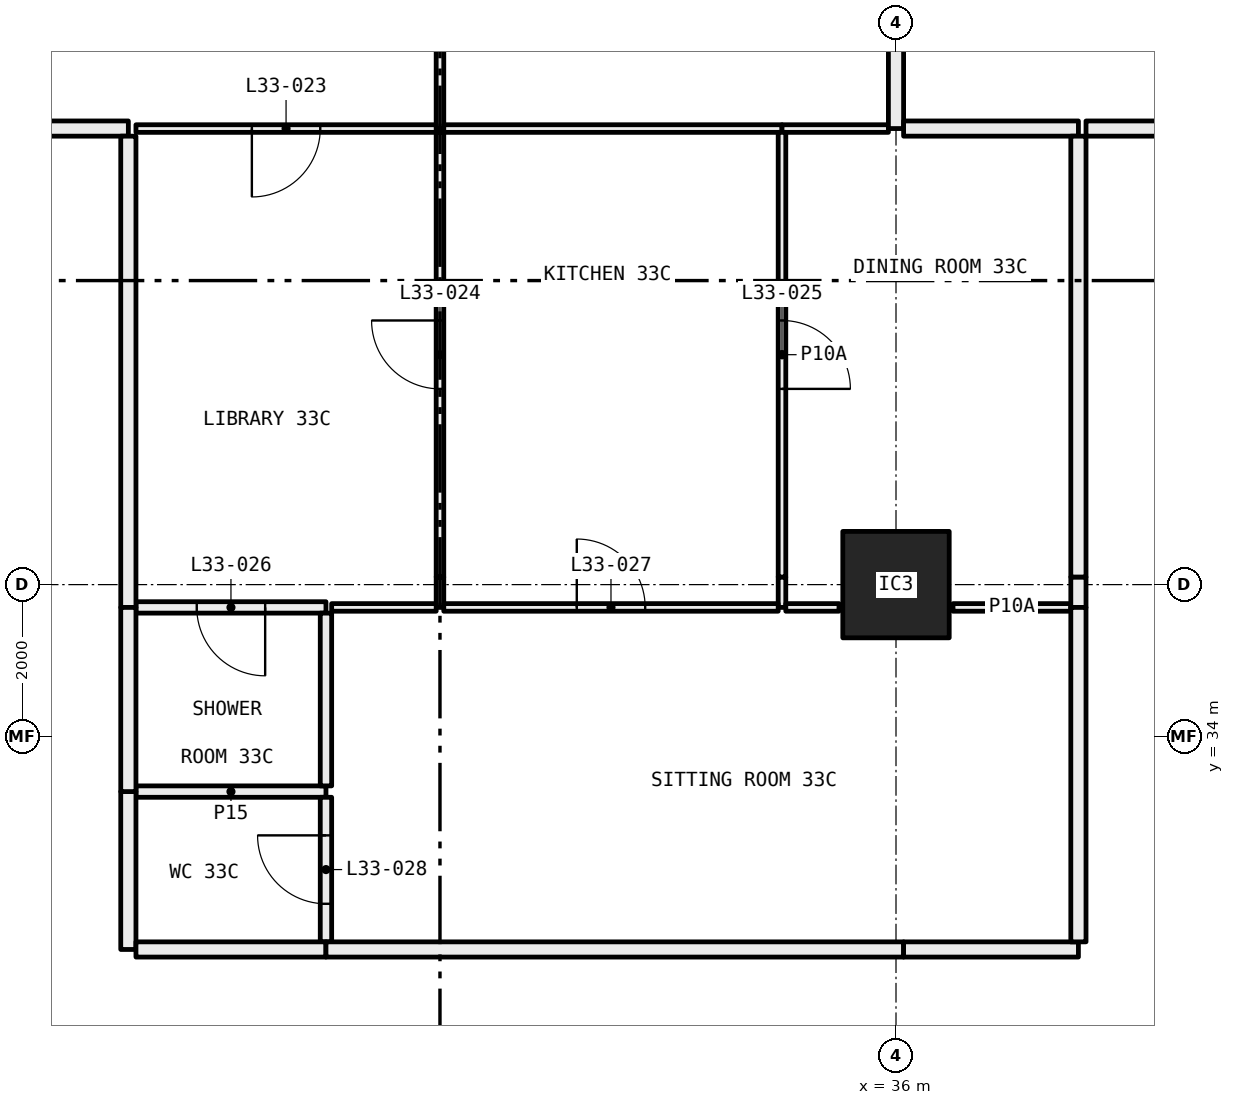
"""IFC4 building model, lengths in metres.
Left out: names, types, materials, properties, quantities, classifications, styles, units other than length and angle.
Written with IfcOpenShell. Run it as: python <this file> out.ifc"""

import sys

from ifc_helpers import new_model, si_unit, direction, frame, frame_2d, origin, origin_2d, place, context, subcontext, project, spatial, rectangle, hollow_rectangle, extrude, element, fill, save


model = new_model("IFC4")
c1 = context("Model", 3, precision=1e-05, world=origin(), true_north=direction((0.0, 1.0)))
c2 = subcontext(c1, "Body", "Model", "MODEL_VIEW")
j1 = project(units=[si_unit("LENGTHUNIT", "METRE"), si_unit("PLANEANGLEUNIT", "RADIAN")], contexts=[c1])
p1 = place(None, origin())
s1 = spatial("IfcSite", under=j1, at=p1, CompositionType="ELEMENT")
p2 = place(p1, origin())
s2 = spatial("IfcBuilding", under=s1, at=p2, CompositionType="ELEMENT")
p3 = place(p2, frame((0.0, 0.0, 127.65)))
s3 = spatial("IfcBuildingStorey", under=s2, at=p3, CompositionType="ELEMENT", Elevation=127.65)
p4 = place(p3, frame((36.0, 36.0, 0.0), z_axis=(0.0, 0.0, 1.0), x_axis=(1.0, 0.0, 0.0)))
e1 = element("IfcColumn", 1, at=p4, inside=s3, PredefinedType="COLUMN", context=c2, shape_type="SweptSolid", body=[
    extrude(hollow_rectangle(XDim=1.4, YDim=1.4, WallThickness=0.06, at=origin_2d()), origin(), (0.0, 0.0, 1.0), 3.05),
])
p5 = place(p3, frame((30.0, 42.0, 0.0), z_axis=(0.0, 0.0, 1.0), x_axis=(0.0, 1.0, 0.0)))
e2 = element("IfcWall", 2, at=p5, inside=s3, PredefinedType="PARTITIONING", context=c2, shape_type="SweptSolid", body=[
    extrude(rectangle(XDim=5.28, YDim=0.1, at=frame_2d((2.64, 0.0))), origin(), (0.0, 0.0, 1.0), 3.05),
])
p6 = place(p5, frame((2.19, 0.0, 0.0)))
e3 = element("IfcOpeningElement", 3, at=p6, cuts=e2, PredefinedType="OPENING", context=c2, shape_type="SweptSolid", body=[
    extrude(rectangle(XDim=0.9, YDim=2.1, at=frame_2d((0.45, 1.05))), frame((0.0, 0.06, 0.0), z_axis=(0.0, -1.0, 0.0), x_axis=(1.0, 0.0, 0.0)), (0.0, 0.0, 1.0), 0.12),
])
p7 = place(p3, frame((26.0, 42.0, 0.0), z_axis=(0.0, 0.0, 1.0), x_axis=(1.0, 0.0, 0.0)))
e4 = element("IfcWall", 4, at=p7, inside=s3, PredefinedType="PARTITIONING", context=c2, shape_type="SweptSolid", body=[
    extrude(rectangle(XDim=3.95, YDim=0.1, at=frame_2d((1.975, 0.0))), origin(), (0.0, 0.0, 1.0), 3.05),
])
p8 = place(p7, frame((1.525, 0.0, 0.0)))
e5 = element("IfcOpeningElement", 5, at=p8, cuts=e4, PredefinedType="OPENING", context=c2, shape_type="SweptSolid", body=[
    extrude(rectangle(XDim=0.9, YDim=2.1, at=frame_2d((0.45, 1.05))), frame((0.0, 0.06, 0.0), z_axis=(0.0, -1.0, 0.0), x_axis=(1.0, 0.0, 0.0)), (0.0, 0.0, 1.0), 0.12),
])
p9 = place(p3, frame((24.0, 42.0, 0.0), z_axis=(0.0, 0.0, 1.0), x_axis=(1.0, 0.0, 0.0)))
e6 = element("IfcWall", 6, at=p9, inside=s3, PredefinedType="PARTITIONING", context=c2, shape_type="SweptSolid", body=[
    extrude(rectangle(XDim=1.9, YDim=0.2, at=frame_2d((0.95, 0.0))), origin(), (0.0, 0.0, 1.0), 3.05),
])
p10 = place(p3, frame((30.05, 42.0, 0.0), z_axis=(0.0, 0.0, 1.0), x_axis=(1.0, 0.0, 0.0)))
e7 = element("IfcWall", 7, at=p10, inside=s3, PredefinedType="PARTITIONING", context=c2, shape_type="SweptSolid", body=[
    extrude(rectangle(XDim=4.45, YDim=0.1, at=frame_2d((2.225, 0.0))), origin(), (0.0, 0.0, 1.0), 3.05),
])
p11 = place(p3, frame((34.5, 42.0, 0.0), z_axis=(0.0, 0.0, 1.0), x_axis=(1.0, 0.0, 0.0)))
e8 = element("IfcWall", 8, at=p11, inside=s3, PredefinedType="PARTITIONING", context=c2, shape_type="SweptSolid", body=[
    extrude(rectangle(XDim=1.4, YDim=0.1, at=frame_2d((0.7, 0.0))), origin(), (0.0, 0.0, 1.0), 3.05),
])
p12 = place(p3, frame((36.0, 42.0, 0.0), z_axis=(0.0, 0.0, 1.0), x_axis=(0.0, 1.0, 0.0)))
e9 = element("IfcWall", 9, at=p12, inside=s3, PredefinedType="PARTITIONING", context=c2, shape_type="SweptSolid", body=[
    extrude(rectangle(XDim=5.28, YDim=0.2, at=frame_2d((2.64, 0.0))), origin(), (0.0, 0.0, 1.0), 2.45),
])
p13 = place(p3, frame((30.0, 35.7, 0.0), z_axis=(0.0, 0.0, 1.0), x_axis=(0.0, 1.0, 0.0)))
e10 = element("IfcWall", 10, at=p13, inside=s3, PredefinedType="PARTITIONING", context=c2, shape_type="SweptSolid", body=[
    extrude(rectangle(XDim=0.4, YDim=0.1, at=frame_2d((0.2, 0.0))), origin(), (0.0, 0.0, 1.0), 2.45),
])
p14 = place(p3, frame((30.0, 36.1, 0.0), z_axis=(0.0, 0.0, 1.0), x_axis=(0.0, 1.0, 0.0)))
e11 = element("IfcWall", 11, at=p14, inside=s3, PredefinedType="PARTITIONING", context=c2, shape_type="SweptSolid", body=[
    extrude(rectangle(XDim=5.85, YDim=0.1, at=frame_2d((2.925, 0.0))), origin(), (0.0, 0.0, 1.0), 3.05),
])
p15 = place(p14, frame((2.475, 0.0, 0.0)))
e12 = element("IfcOpeningElement", 12, at=p15, cuts=e11, PredefinedType="OPENING", context=c2, shape_type="SweptSolid", body=[
    extrude(rectangle(XDim=0.9, YDim=2.1, at=frame_2d((0.45, 1.05))), frame((0.0, 0.06, 0.0), z_axis=(0.0, -1.0, 0.0), x_axis=(1.0, 0.0, 0.0)), (0.0, 0.0, 1.0), 0.12),
])
p16 = place(p3, frame((26.0, 35.7, 0.0), z_axis=(0.0, 0.0, 1.0), x_axis=(1.0, 0.0, 0.0)))
e13 = element("IfcWall", 13, at=p16, inside=s3, PredefinedType="PARTITIONING", context=c2, shape_type="SweptSolid", body=[
    extrude(rectangle(XDim=2.5, YDim=0.15, at=frame_2d((1.25, 0.0))), origin(), (0.0, 0.0, 1.0), 3.05),
])
p17 = place(p16, frame((0.8, 0.0, 0.0)))
e14 = element("IfcOpeningElement", 14, at=p17, cuts=e13, PredefinedType="OPENING", context=c2, shape_type="SweptSolid", body=[
    extrude(rectangle(XDim=0.9, YDim=2.1, at=frame_2d((0.45, 1.05))), frame((0.0, 0.085, 0.0), z_axis=(0.0, -1.0, 0.0), x_axis=(1.0, 0.0, 0.0)), (0.0, 0.0, 1.0), 0.17),
])
p18 = place(p3, frame((28.575, 35.7, 0.0), z_axis=(0.0, 0.0, 1.0), x_axis=(1.0, 0.0, 0.0)))
e15 = element("IfcWall", 15, at=p18, inside=s3, PredefinedType="PARTITIONING", context=c2, shape_type="SweptSolid", body=[
    extrude(rectangle(XDim=1.375, YDim=0.1, at=frame_2d((0.688, 0.0))), origin(), (0.0, 0.0, 1.0), 3.05),
])
p19 = place(p3, frame((25.9, 41.9, 0.0), z_axis=(0.0, 0.0, 1.0), x_axis=(0.0, -1.0, 0.0)))
e16 = element("IfcWall", 16, at=p19, inside=s3, PredefinedType="PARTITIONING", context=c2, shape_type="SweptSolid", body=[
    extrude(rectangle(XDim=6.2, YDim=0.2, at=frame_2d((3.1, 0.0))), origin(), (0.0, 0.0, 1.0), 2.45),
])
p20 = place(p3, frame((34.5, 35.7, 0.0), z_axis=(0.0, 0.0, 1.0), x_axis=(0.0, 1.0, 0.0)))
e17 = element("IfcWall", 17, at=p20, inside=s3, PredefinedType="PARTITIONING", context=c2, shape_type="SweptSolid", body=[
    extrude(rectangle(XDim=0.4, YDim=0.1, at=frame_2d((0.2, 0.0))), origin(), (0.0, 0.0, 1.0), 2.45),
])
p21 = place(p3, frame((34.5, 36.1, 0.0), z_axis=(0.0, 0.0, 1.0), x_axis=(0.0, 1.0, 0.0)))
e18 = element("IfcWall", 18, at=p21, inside=s3, PredefinedType="PARTITIONING", context=c2, shape_type="SweptSolid", body=[
    extrude(rectangle(XDim=5.85, YDim=0.1, at=frame_2d((2.925, 0.0))), origin(), (0.0, 0.0, 1.0), 3.05),
])
p22 = place(p21, frame((2.475, 0.0, 0.0)))
e19 = element("IfcOpeningElement", 19, at=p22, cuts=e18, PredefinedType="OPENING", context=c2, shape_type="SweptSolid", body=[
    extrude(rectangle(XDim=0.9, YDim=2.1, at=frame_2d((0.45, 1.05))), frame((0.0, 0.06, 0.0), z_axis=(0.0, -1.0, 0.0), x_axis=(1.0, 0.0, 0.0)), (0.0, 0.0, 1.0), 0.12),
])
p23 = place(p3, frame((30.05, 35.7, 0.0), z_axis=(0.0, 0.0, 1.0), x_axis=(1.0, 0.0, 0.0)))
e20 = element("IfcWall", 20, at=p23, inside=s3, PredefinedType="PARTITIONING", context=c2, shape_type="SweptSolid", body=[
    extrude(rectangle(XDim=4.4, YDim=0.1, at=frame_2d((2.2, 0.0))), origin(), (0.0, 0.0, 1.0), 3.05),
])
p24 = place(p23, frame((1.75, 0.0, 0.0)))
e21 = element("IfcOpeningElement", 21, at=p24, cuts=e20, PredefinedType="OPENING", context=c2, shape_type="SweptSolid", body=[
    extrude(rectangle(XDim=0.9, YDim=2.1, at=frame_2d((0.45, 1.05))), frame((0.0, 0.06, 0.0), z_axis=(0.0, -1.0, 0.0), x_axis=(1.0, 0.0, 0.0)), (0.0, 0.0, 1.0), 0.12),
])
p25 = place(p3, frame((34.55, 35.7, 0.0), z_axis=(0.0, 0.0, 1.0), x_axis=(1.0, 0.0, 0.0)))
e22 = element("IfcWall", 22, at=p25, inside=s3, PredefinedType="PARTITIONING", context=c2, shape_type="SweptSolid", body=[
    extrude(rectangle(XDim=0.7, YDim=0.1, at=frame_2d((0.35, 0.0))), origin(), (0.0, 0.0, 1.0), 3.05),
])
p26 = place(p3, frame((36.75, 35.7, 0.0), z_axis=(0.0, 0.0, 1.0), x_axis=(1.0, 0.0, 0.0)))
e23 = element("IfcWall", 23, at=p26, inside=s3, PredefinedType="PARTITIONING", context=c2, shape_type="SweptSolid", body=[
    extrude(rectangle(XDim=1.55, YDim=0.1, at=frame_2d((0.775, 0.0))), origin(), (0.0, 0.0, 1.0), 3.05),
])
p27 = place(p3, frame((38.4, 42.0, 0.0), z_axis=(0.0, 0.0, 1.0), x_axis=(-1.0, 0.0, 0.0)))
e24 = element("IfcWall", 24, at=p27, inside=s3, PredefinedType="PARTITIONING", context=c2, shape_type="SweptSolid", body=[
    extrude(rectangle(XDim=2.3, YDim=0.2, at=frame_2d((1.15, 0.0))), origin(), (0.0, 0.0, 1.0), 3.05),
])
p28 = place(p3, frame((38.4, 35.7, 0.0), z_axis=(0.0, 0.0, 1.0), x_axis=(0.0, 1.0, 0.0)))
e25 = element("IfcWall", 25, at=p28, inside=s3, PredefinedType="PARTITIONING", context=c2, shape_type="SweptSolid", body=[
    extrude(rectangle(XDim=0.4, YDim=0.2, at=frame_2d((0.2, 0.0))), origin(), (0.0, 0.0, 1.0), 2.45),
])
p29 = place(p3, frame((38.4, 36.1, 0.0), z_axis=(0.0, 0.0, 1.0), x_axis=(0.0, 1.0, 0.0)))
e26 = element("IfcWall", 26, at=p29, inside=s3, PredefinedType="PARTITIONING", context=c2, shape_type="SweptSolid", body=[
    extrude(rectangle(XDim=5.8, YDim=0.2, at=frame_2d((2.9, 0.0))), origin(), (0.0, 0.0, 1.0), 3.05),
])
p30 = place(p3, frame((28.5, 33.277, 0.0), z_axis=(0.0, 0.0, 1.0), x_axis=(-1.0, 0.0, 0.0)))
e27 = element("IfcWall", 27, at=p30, inside=s3, PredefinedType="PARTITIONING", context=c2, shape_type="SweptSolid", body=[
    extrude(rectangle(XDim=2.5, YDim=0.15, at=frame_2d((1.25, 0.0))), origin(), (0.0, 0.0, 1.0), 3.05),
])
p31 = place(p3, frame((28.5, 31.3, 0.0), z_axis=(0.0, 0.0, 1.0), x_axis=(0.0, 1.0, 0.0)))
e28 = element("IfcWall", 28, at=p31, inside=s3, PredefinedType="PARTITIONING", context=c2, shape_type="SweptSolid", body=[
    extrude(rectangle(XDim=1.902, YDim=0.15, at=frame_2d((0.951, 0.0))), origin(), (0.0, 0.0, 1.0), 3.05),
])
p32 = place(p31, frame((0.501, 0.0, 0.0)))
e29 = element("IfcOpeningElement", 29, at=p32, cuts=e28, PredefinedType="OPENING", context=c2, shape_type="SweptSolid", body=[
    extrude(rectangle(XDim=0.9, YDim=2.1, at=frame_2d((0.45, 1.05))), frame((0.0, 0.085, 0.0), z_axis=(0.0, -1.0, 0.0), x_axis=(1.0, 0.0, 0.0)), (0.0, 0.0, 1.0), 0.17),
])
p33 = place(p3, frame((25.9, 33.277, 0.0), z_axis=(0.0, 0.0, 1.0), x_axis=(0.0, -1.0, 0.0)))
e30 = element("IfcWall", 30, at=p33, inside=s3, PredefinedType="PARTITIONING", context=c2, shape_type="SweptSolid", body=[
    extrude(rectangle(XDim=2.077, YDim=0.2, at=frame_2d((1.039, 0.0))), origin(), (0.0, 0.0, 1.0), 3.05),
])
p34 = place(p3, frame((26.0, 31.2, 0.0), z_axis=(0.0, 0.0, 1.0), x_axis=(1.0, 0.0, 0.0)))
e31 = element("IfcWall", 31, at=p34, inside=s3, PredefinedType="PARTITIONING", context=c2, shape_type="SweptSolid", body=[
    extrude(rectangle(XDim=2.5, YDim=0.2, at=frame_2d((1.25, 0.0))), origin(), (0.0, 0.0, 1.0), 3.05),
])
p35 = place(p3, frame((28.5, 33.352, 0.0), z_axis=(0.0, 0.0, 1.0), x_axis=(0.0, 1.0, 0.0)))
e32 = element("IfcWall", 32, at=p35, inside=s3, PredefinedType="PARTITIONING", context=c2, shape_type="SweptSolid", body=[
    extrude(rectangle(XDim=2.273, YDim=0.15, at=frame_2d((1.136, 0.0))), origin(), (0.0, 0.0, 1.0), 3.05),
])
p36 = place(p3, frame((25.9, 35.7, 0.0), z_axis=(0.0, 0.0, 1.0), x_axis=(0.0, -1.0, 0.0)))
e33 = element("IfcWall", 33, at=p36, inside=s3, PredefinedType="PARTITIONING", context=c2, shape_type="SweptSolid", body=[
    extrude(rectangle(XDim=2.423, YDim=0.2, at=frame_2d((1.211, 0.0))), origin(), (0.0, 0.0, 1.0), 3.05),
])
p37 = place(p3, frame((28.5, 31.2, 0.0), z_axis=(0.0, 0.0, 1.0), x_axis=(1.0, 0.0, 0.0)))
e34 = element("IfcWall", 34, at=p37, inside=s3, PredefinedType="PARTITIONING", context=c2, shape_type="SweptSolid", body=[
    extrude(rectangle(XDim=7.6, YDim=0.2, at=frame_2d((3.8, 0.0))), origin(), (0.0, 0.0, 1.0), 2.45),
])
p38 = place(p3, frame((36.1, 31.2, 0.0), z_axis=(0.0, 0.0, 1.0), x_axis=(1.0, 0.0, 0.0)))
e35 = element("IfcWall", 35, at=p38, inside=s3, PredefinedType="PARTITIONING", context=c2, shape_type="SweptSolid", body=[
    extrude(rectangle(XDim=2.3, YDim=0.2, at=frame_2d((1.15, 0.0))), origin(), (0.0, 0.0, 1.0), 3.05),
])
p39 = place(p3, frame((38.4, 31.3, 0.0), z_axis=(0.0, 0.0, 1.0), x_axis=(0.0, 1.0, 0.0)))
e36 = element("IfcWall", 36, at=p39, inside=s3, PredefinedType="PARTITIONING", context=c2, shape_type="SweptSolid", body=[
    extrude(rectangle(XDim=4.4, YDim=0.2, at=frame_2d((2.2, 0.0))), origin(), (0.0, 0.0, 1.0), 3.05),
])
p40 = place(p3, frame((38.5, 42.0, 0.0), z_axis=(0.0, 0.0, 1.0), x_axis=(1.0, 0.0, 0.0)))
e37 = element("IfcWall", 37, at=p40, inside=s3, PredefinedType="PARTITIONING", context=c2, shape_type="SweptSolid", body=[
    extrude(rectangle(XDim=2.3, YDim=0.2, at=frame_2d((1.15, 0.0))), origin(), (0.0, 0.0, 1.0), 3.05),
])
p41 = place(p8, frame((0.9, 0.0, 0.0), x_axis=(-1.0, 0.0, 0.0)))
e38 = element("IfcDoor", 38, at=p41, inside=s3, OperationType="SINGLE_SWING_LEFT", PredefinedType="DOOR", context=c2, shape_type="SweptSolid", body=[
    extrude(rectangle(XDim=0.9, YDim=2.1, at=frame_2d((0.45, 1.05))), frame((0.0, 0.025, 0.0), z_axis=(0.0, -1.0, 0.0), x_axis=(1.0, 0.0, 0.0)), (0.0, 0.0, 1.0), 0.05),
])
fill(e5, e38)
p42 = place(p15, origin())
e39 = element("IfcDoor", 39, at=p42, inside=s3, OperationType="SINGLE_SWING_LEFT", PredefinedType="DOOR", context=c2, shape_type="SweptSolid", body=[
    extrude(rectangle(XDim=0.9, YDim=2.1, at=frame_2d((0.45, 1.05))), frame((0.0, 0.025, 0.0), z_axis=(0.0, -1.0, 0.0), x_axis=(1.0, 0.0, 0.0)), (0.0, 0.0, 1.0), 0.05),
])
fill(e12, e39)
p43 = place(p22, frame((0.9, 0.0, 0.0), x_axis=(-1.0, 0.0, 0.0)))
e40 = element("IfcDoor", 40, at=p43, inside=s3, OperationType="SINGLE_SWING_LEFT", PredefinedType="DOOR", context=c2, shape_type="SweptSolid", body=[
    extrude(rectangle(XDim=0.9, YDim=2.1, at=frame_2d((0.45, 1.05))), frame((0.0, 0.025, 0.0), z_axis=(0.0, -1.0, 0.0), x_axis=(1.0, 0.0, 0.0)), (0.0, 0.0, 1.0), 0.05),
])
fill(e19, e40)
p44 = place(p17, frame((0.9, 0.0, 0.0), x_axis=(-1.0, 0.0, 0.0)))
e41 = element("IfcDoor", 41, at=p44, inside=s3, OperationType="SINGLE_SWING_RIGHT", PredefinedType="DOOR", context=c2, shape_type="SweptSolid", body=[
    extrude(rectangle(XDim=0.9, YDim=2.1, at=frame_2d((0.45, 1.05))), frame((0.0, 0.025, 0.0), z_axis=(0.0, -1.0, 0.0), x_axis=(1.0, 0.0, 0.0)), (0.0, 0.0, 1.0), 0.05),
])
fill(e14, e41)
p45 = place(p24, origin())
e42 = element("IfcDoor", 42, at=p45, inside=s3, OperationType="SINGLE_SWING_RIGHT", PredefinedType="DOOR", context=c2, shape_type="SweptSolid", body=[
    extrude(rectangle(XDim=0.9, YDim=2.1, at=frame_2d((0.45, 1.05))), frame((0.0, 0.025, 0.0), z_axis=(0.0, -1.0, 0.0), x_axis=(1.0, 0.0, 0.0)), (0.0, 0.0, 1.0), 0.05),
])
fill(e21, e42)
p46 = place(p32, origin())
e43 = element("IfcDoor", 43, at=p46, inside=s3, OperationType="SINGLE_SWING_LEFT", PredefinedType="DOOR", context=c2, shape_type="SweptSolid", body=[
    extrude(rectangle(XDim=0.9, YDim=2.1, at=frame_2d((0.45, 1.05))), frame((0.0, 0.025, 0.0), z_axis=(0.0, -1.0, 0.0), x_axis=(1.0, 0.0, 0.0)), (0.0, 0.0, 1.0), 0.05),
])
fill(e29, e43)
save(model, sys.argv[1])
